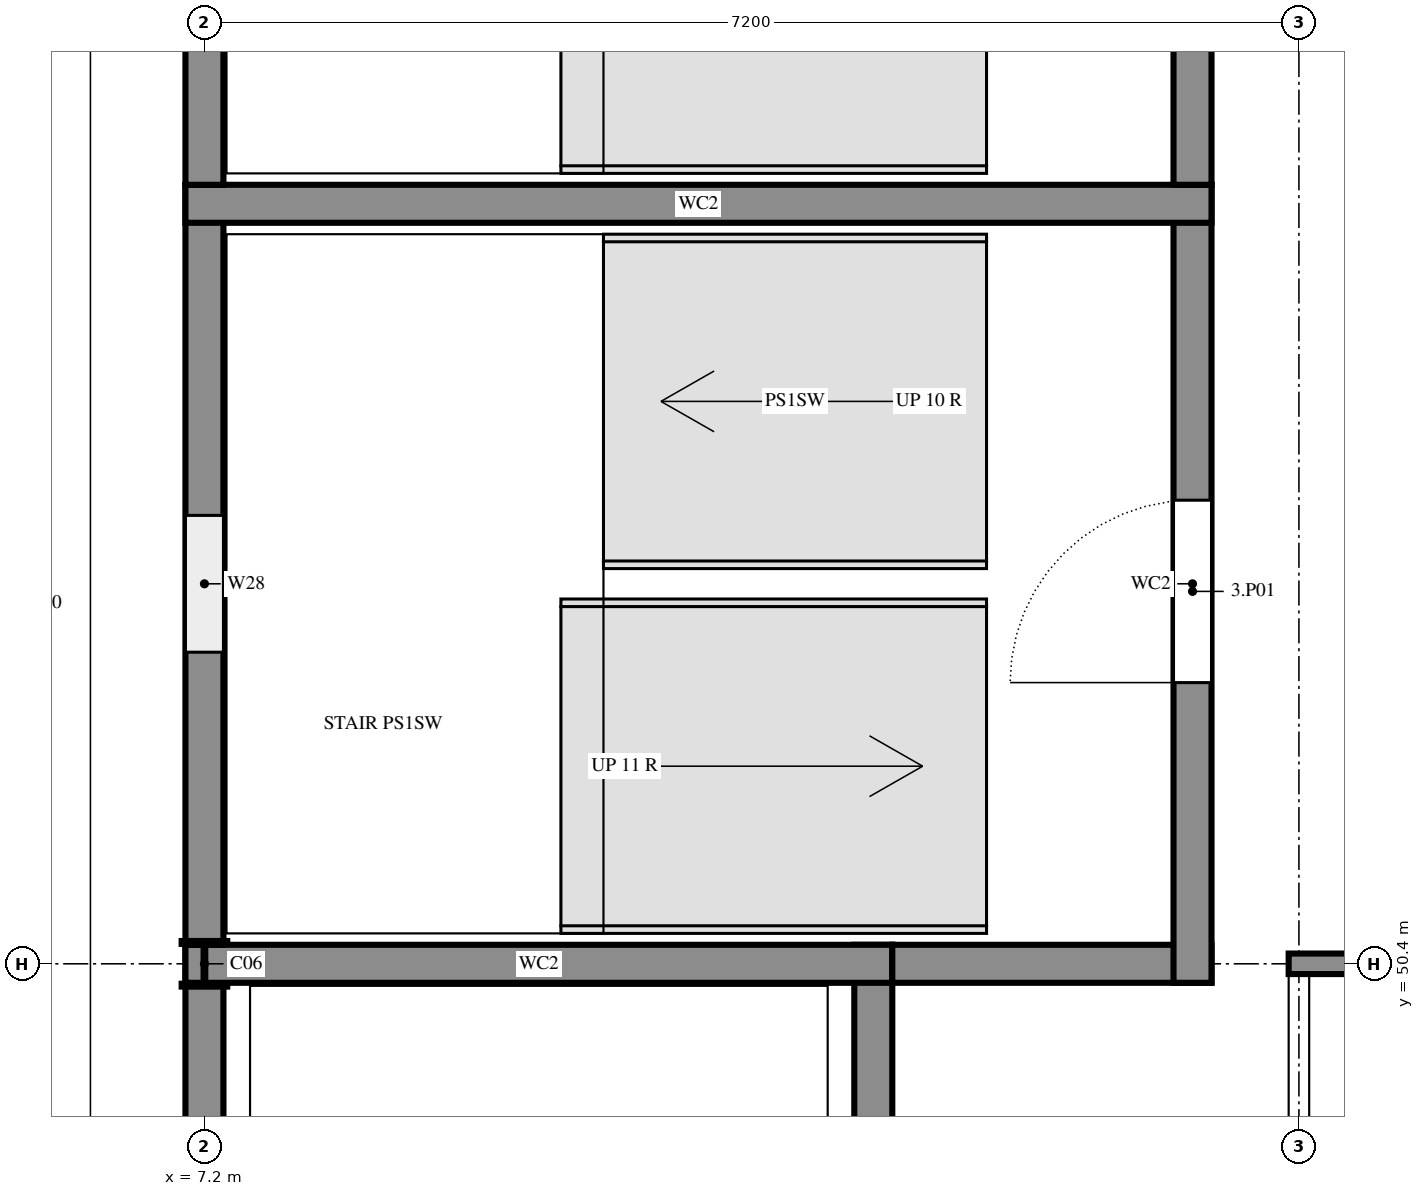
"""IFC4 building model, lengths in metres.
Left out: names, types, materials, properties, quantities, classifications, styles, units other than length and angle.
Written with IfcOpenShell. Run it as: python <this file> out.ifc"""

import sys

from ifc_helpers import new_model, si_unit, direction, frame, frame_2d, origin, origin_2d, place, context, subcontext, project, spatial, rectangle, i_section, extrude, element, fill, save


model = new_model("IFC4")
c1 = context("Model", 3, precision=1e-05, world=origin(), true_north=direction((0.0, 1.0)))
c2 = subcontext(c1, "Body", "Model", "MODEL_VIEW")
j1 = project(units=[si_unit("LENGTHUNIT", "METRE"), si_unit("PLANEANGLEUNIT", "RADIAN")], contexts=[c1])
p1 = place(None, origin())
s1 = spatial("IfcSite", under=j1, at=p1, CompositionType="ELEMENT")
p2 = place(p1, origin())
s2 = spatial("IfcBuilding", under=s1, at=p2, CompositionType="ELEMENT")
p3 = place(p2, frame((0.0, 0.0, 10.8)))
s3 = spatial("IfcBuildingStorey", under=s2, at=p3, CompositionType="ELEMENT", Elevation=10.8)
p4 = place(p3, frame((7.2, 50.4, 0.0), z_axis=(0.0, 0.0, 1.0), x_axis=(1.0, 0.0, 0.0)))
e1 = element("IfcColumn", 1, at=p4, inside=s3, PredefinedType="COLUMN", context=c2, shape_type="SweptSolid", body=[
    extrude(i_section(OverallWidth=0.3, OverallDepth=0.3, WebThickness=0.011, FlangeThickness=0.019, FilletRadius=0.027, at=origin_2d()), origin(), (0.0, 0.0, 1.0), 3.6),
])
p5 = place(p3, frame((11.6, 44.275, 0.0), z_axis=(0.0, 0.0, 1.0), x_axis=(0.0, 1.0, 0.0)))
e2 = element("IfcWall", 2, at=p5, inside=s3, PredefinedType="SHEAR", context=c2, shape_type="SweptSolid", body=[
    extrude(rectangle(XDim=6.25, YDim=0.25, at=frame_2d((3.125, 0.0))), origin(), (0.0, 0.0, 1.0), 3.6),
])
p6 = place(p5, frame((0.375, 0.0, 0.0)))
e3 = element("IfcOpeningElement", 3, at=p6, cuts=e2, PredefinedType="OPENING", context=c2, shape_type="SweptSolid", body=[
    extrude(rectangle(XDim=1.0, YDim=2.4, at=frame_2d((0.5, 1.2))), frame((0.0, 0.135, 0.0), z_axis=(0.0, -1.0, 0.0), x_axis=(1.0, 0.0, 0.0)), (0.0, 0.0, 1.0), 0.27),
])
p7 = place(p3, frame((7.2, 50.525, 0.0), z_axis=(0.0, 0.0, 1.0), x_axis=(0.0, -1.0, 0.0)))
e4 = element("IfcWall", 4, at=p7, inside=s3, PredefinedType="SHEAR", context=c2, shape_type="SweptSolid", body=[
    extrude(rectangle(XDim=6.25, YDim=0.25, at=frame_2d((3.125, 0.0))), origin(), (0.0, 0.0, 1.0), 3.6),
])
p8 = place(p7, frame((2.675, 0.0, 0.6)))
e5 = element("IfcOpeningElement", 5, at=p8, cuts=e4, PredefinedType="OPENING", context=c2, shape_type="SweptSolid", body=[
    extrude(rectangle(XDim=0.9, YDim=2.1, at=frame_2d((0.45, 1.05))), frame((0.0, 0.135, 0.0), z_axis=(0.0, -1.0, 0.0), x_axis=(1.0, 0.0, 0.0)), (0.0, 0.0, 1.0), 0.27),
])
p9 = place(p3, frame((11.725, 50.4, 0.0), z_axis=(0.0, 0.0, 1.0), x_axis=(-1.0, 0.0, 0.0)))
e6 = element("IfcWall", 6, at=p9, inside=s3, PredefinedType="SHEAR", context=c2, shape_type="SweptSolid", body=[
    extrude(rectangle(XDim=4.65, YDim=0.25, at=frame_2d((2.325, 0.0))), origin(), (0.0, 0.0, 1.0), 3.6),
])
p10 = place(p3, frame((11.725, 50.4, 0.0), z_axis=(0.0, 0.0, 1.0), x_axis=(1.0, 0.0, 0.0)))
e7 = element("IfcWall", 7, at=p10, inside=s3, PredefinedType="SHEAR", context=c2, shape_type="SweptSolid", body=[
    extrude(rectangle(XDim=2.1, YDim=0.25, at=frame_2d((1.05, 0.0))), origin(), (0.0, 0.0, 1.0), 3.6),
])
p11 = place(p3, frame((13.7, 50.275, 0.0), z_axis=(0.0, 0.0, 1.0), x_axis=(0.0, 1.0, 0.0)))
e8 = element("IfcWall", 8, at=p11, inside=s3, PredefinedType="SHEAR", context=c2, shape_type="SweptSolid", body=[
    extrude(rectangle(XDim=5.25, YDim=0.25, at=frame_2d((2.625, 0.0))), origin(), (0.0, 0.0, 1.0), 3.6),
])
p12 = place(p11, frame((1.975, 0.0, 0.0)))
e9 = element("IfcOpeningElement", 9, at=p12, cuts=e8, PredefinedType="OPENING", context=c2, shape_type="SweptSolid", body=[
    extrude(rectangle(XDim=1.2, YDim=2.4, at=frame_2d((0.6, 1.2))), frame((0.0, 0.135, 0.0), z_axis=(0.0, -1.0, 0.0), x_axis=(1.0, 0.0, 0.0)), (0.0, 0.0, 1.0), 0.27),
])
p13 = place(p3, frame((7.2, 55.525, 0.0), z_axis=(0.0, 0.0, 1.0), x_axis=(0.0, -1.0, 0.0)))
e10 = element("IfcWall", 10, at=p13, inside=s3, PredefinedType="SHEAR", context=c2, shape_type="SweptSolid", body=[
    extrude(rectangle(XDim=5.0, YDim=0.25, at=frame_2d((2.5, 0.0))), origin(), (0.0, 0.0, 1.0), 3.6),
])
p14 = place(p13, frame((2.175, 0.0, 0.6)))
e11 = element("IfcOpeningElement", 11, at=p14, cuts=e10, PredefinedType="OPENING", context=c2, shape_type="SweptSolid", body=[
    extrude(rectangle(XDim=0.9, YDim=2.1, at=frame_2d((0.45, 1.05))), frame((0.0, 0.135, 0.0), z_axis=(0.0, -1.0, 0.0), x_axis=(1.0, 0.0, 0.0)), (0.0, 0.0, 1.0), 0.27),
])
p15 = place(p3, frame((13.825, 55.4, 0.0), z_axis=(0.0, 0.0, 1.0), x_axis=(-1.0, 0.0, 0.0)))
e12 = element("IfcWall", 12, at=p15, inside=s3, PredefinedType="SHEAR", context=c2, shape_type="SweptSolid", body=[
    extrude(rectangle(XDim=6.75, YDim=0.25, at=frame_2d((3.375, 0.0))), origin(), (0.0, 0.0, 1.0), 3.6),
])
p16 = place(p3, frame((13.7, 55.525, 0.0), z_axis=(0.0, 0.0, 1.0), x_axis=(0.0, 1.0, 0.0)))
e13 = element("IfcWall", 13, at=p16, inside=s3, PredefinedType="SHEAR", context=c2, shape_type="SweptSolid", body=[
    extrude(rectangle(XDim=5.0, YDim=0.25, at=frame_2d((2.5, 0.0))), origin(), (0.0, 0.0, 1.0), 3.6),
])
p17 = place(p3, frame((7.2, 60.525, 0.0), z_axis=(0.0, 0.0, 1.0), x_axis=(0.0, -1.0, 0.0)))
e14 = element("IfcWall", 14, at=p17, inside=s3, PredefinedType="SHEAR", context=c2, shape_type="SweptSolid", body=[
    extrude(rectangle(XDim=5.0, YDim=0.25, at=frame_2d((2.5, 0.0))), origin(), (0.0, 0.0, 1.0), 3.6),
])
p18 = place(p17, frame((2.175, 0.0, 0.6)))
e15 = element("IfcOpeningElement", 15, at=p18, cuts=e14, PredefinedType="OPENING", context=c2, shape_type="SweptSolid", body=[
    extrude(rectangle(XDim=0.9, YDim=2.1, at=frame_2d((0.45, 1.05))), frame((0.0, 0.135, 0.0), z_axis=(0.0, -1.0, 0.0), x_axis=(1.0, 0.0, 0.0)), (0.0, 0.0, 1.0), 0.27),
])
p19 = place(p3, frame((14.4, 50.333, 0.0), z_axis=(0.0, 0.0, 1.0), x_axis=(0.0, -1.0, 0.0)))
e16 = element("IfcWall", 16, at=p19, inside=s3, PredefinedType="PARTITIONING", context=c2, shape_type="SweptSolid", body=[
    extrude(rectangle(XDim=14.265, YDim=0.135, at=frame_2d((7.133, 0.0))), origin(), (0.0, 0.0, 1.0), 3.12),
])
p20 = place(p19, frame((6.35, 0.0, 0.0)))
e17 = element("IfcOpeningElement", 17, at=p20, cuts=e16, PredefinedType="OPENING", context=c2, shape_type="SweptSolid", body=[
    extrude(rectangle(XDim=1.5, YDim=2.1, at=frame_2d((0.75, 1.05))), frame((0.0, 0.077, 0.0), z_axis=(0.0, -1.0, 0.0), x_axis=(1.0, 0.0, 0.0)), (0.0, 0.0, 1.0), 0.155),
])
p21 = place(p3, frame((18.0, 50.4, 0.0), z_axis=(0.0, 0.0, 1.0), x_axis=(-1.0, 0.0, 0.0)))
e18 = element("IfcWall", 18, at=p21, inside=s3, PredefinedType="PARTITIONING", context=c2, shape_type="SweptSolid", body=[
    extrude(rectangle(XDim=3.667, YDim=0.135, at=frame_2d((1.834, 0.0))), origin(), (0.0, 0.0, 1.0), 3.09),
])
p22 = place(p14, origin())
e19 = element("IfcWindow", 19, at=p22, inside=s3, PartitioningType="SINGLE_PANEL", PredefinedType="WINDOW", context=c2, shape_type="SweptSolid", body=[
    extrude(rectangle(XDim=0.9, YDim=2.1, at=frame_2d((0.45, 1.05))), frame((0.0, 0.03, 0.0), z_axis=(0.0, -1.0, 0.0), x_axis=(1.0, 0.0, 0.0)), (0.0, 0.0, 1.0), 0.06),
])
fill(e11, e19)
p23 = place(p12, origin())
e20 = element("IfcDoor", 20, at=p23, inside=s3, OperationType="SINGLE_SWING_RIGHT", PredefinedType="DOOR", context=c2, shape_type="SweptSolid", body=[
    extrude(rectangle(XDim=1.2, YDim=2.4, at=frame_2d((0.6, 1.2))), frame((0.0, 0.025, 0.0), z_axis=(0.0, -1.0, 0.0), x_axis=(1.0, 0.0, 0.0)), (0.0, 0.0, 1.0), 0.05),
])
fill(e9, e20)
save(model, sys.argv[1])
